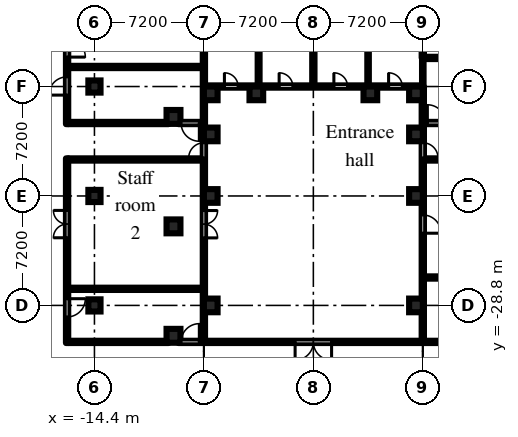
"""IFC4 building model, lengths in metres.
Left out: names, types, materials, properties, quantities, classifications, styles, units other than length and angle.
Written with IfcOpenShell. Run it as: python <this file> out.ifc"""

import sys

from ifc_helpers import new_model, si_unit, direction, frame, frame_2d, origin, origin_2d, place, context, subcontext, project, spatial, rectangle, hollow_circle, extrude, element, fill, save


model = new_model("IFC4")
c1 = context("Model", 3, precision=1e-05, world=origin(), true_north=direction((0.0, 1.0)))
c2 = subcontext(c1, "Body", "Model", "MODEL_VIEW")
j1 = project(units=[si_unit("LENGTHUNIT", "METRE"), si_unit("PLANEANGLEUNIT", "RADIAN")], contexts=[c1])
p1 = place(None, origin())
s1 = spatial("IfcSite", under=j1, at=p1, CompositionType="ELEMENT")
p2 = place(p1, origin())
s2 = spatial("IfcBuilding", under=s1, at=p2, CompositionType="ELEMENT")
p3 = place(p2, origin())
s3 = spatial("IfcBuildingStorey", under=s2, at=p3, CompositionType="ELEMENT", Elevation=0.0)
for number, where, z_axis, x_axis in (
    (1, (-6.75, -28.8, 0.0), (0.0, 0.0, 1.0), (1.0, 0.0, 0.0)),
    (2, (-6.75, -21.6, 0.0), (0.0, 0.0, 1.0), (1.0, 0.0, 0.0)),
    (3, (-6.75, -17.55, 0.0), (0.0, 0.0, 1.0), (1.0, 0.0, 0.0)),
    (4, (-6.75, -14.85, 0.0), (0.0, 0.0, 1.0), (1.0, 0.0, 0.0)),
    (5, (-3.75, -14.85, 0.0), (0.0, 0.0, 1.0), (1.0, 0.0, 0.0)),
    (6, (3.75, -14.85, 0.0), (0.0, 0.0, 1.0), (1.0, 0.0, 0.0)),
    (7, (6.75, -28.8, 0.0), (0.0, 0.0, 1.0), (1.0, 0.0, 0.0)),
    (8, (6.75, -21.6, 0.0), (0.0, 0.0, 1.0), (1.0, 0.0, 0.0)),
    (9, (6.75, -17.55, 0.0), (0.0, 0.0, 1.0), (1.0, 0.0, 0.0)),
    (10, (6.75, -14.85, 0.0), (0.0, 0.0, 1.0), (1.0, 0.0, 0.0)),
):
    element("IfcColumn", number, at=place(p3, frame(where, z_axis=z_axis, x_axis=x_axis)), inside=s3, PredefinedType="COLUMN", context=c2, shape_type="SweptSolid", body=[
        extrude(rectangle(XDim=0.9, YDim=0.9, at=origin_2d()), origin(), (0.0, 0.0, 1.0), 7.2),
    ])
for number, where, z_axis, x_axis in (
    (11, (-14.4, -28.8, 0.0), (0.0, 0.0, 1.0), (1.0, 0.0, 0.0)),
    (12, (-14.4, -21.6, 0.0), (0.0, 0.0, 1.0), (1.0, 0.0, 0.0)),
    (13, (-14.4, -14.4, 0.0), (0.0, 0.0, 1.0), (1.0, 0.0, 0.0)),
):
    element("IfcColumn", number, at=place(p3, frame(where, z_axis=z_axis, x_axis=x_axis)), inside=s3, PredefinedType="COLUMN", context=c2, shape_type="SweptSolid", body=[
        extrude(rectangle(XDim=0.8, YDim=0.8, at=origin_2d()), origin(), (0.0, 0.0, 1.0), 6.6),
    ])
for number, where, z_axis, x_axis in (
    (14, (-9.2, -16.4, 0.0), (0.0, 0.0, 1.0), (1.0, 0.0, 0.0)),
    (15, (-9.2, -23.6, 0.0), (0.0, 0.0, 1.0), (1.0, 0.0, 0.0)),
    (16, (-9.2, -30.8, 0.0), (0.0, 0.0, 1.0), (1.0, 0.0, 0.0)),
):
    element("IfcColumn", number, at=place(p3, frame(where, z_axis=z_axis, x_axis=x_axis)), inside=s3, PredefinedType="COLUMN", context=c2, shape_type="SweptSolid", body=[
        extrude(hollow_circle(Radius=0.457, WallThickness=0.05, at=origin_2d()), origin(), (0.0, 0.0, 1.0), 7.5),
    ])
p4 = place(p3, frame((-16.2, -31.275, 0.0), z_axis=(0.0, 0.0, 1.0), x_axis=(0.0, 1.0, 0.0)))
e17 = element("IfcWall", 17, at=p4, inside=s3, PredefinedType="PARTITIONING", context=c2, shape_type="SweptSolid", body=[
    extrude(rectangle(XDim=12.15, YDim=0.15, at=frame_2d((6.075, 0.0))), origin(), (0.0, 0.0, 1.0), 6.6),
])
p5 = place(p4, frame((1.717, 0.0, 0.0)))
e18 = element("IfcOpeningElement", 18, at=p5, cuts=e17, PredefinedType="OPENING", context=c2, shape_type="SweptSolid", body=[
    extrude(rectangle(XDim=1.2, YDim=2.1, at=frame_2d((0.6, 1.05))), frame((0.0, 0.085, 0.0), z_axis=(0.0, -1.0, 0.0), x_axis=(1.0, 0.0, 0.0)), (0.0, 0.0, 1.0), 0.17),
])
p6 = place(p4, frame((6.925, 0.0, 0.0)))
e19 = element("IfcOpeningElement", 19, at=p6, cuts=e17, PredefinedType="OPENING", context=c2, shape_type="SweptSolid", body=[
    extrude(rectangle(XDim=1.8, YDim=2.1, at=frame_2d((0.9, 1.05))), frame((0.0, 0.085, 0.0), z_axis=(0.0, -1.0, 0.0), x_axis=(1.0, 0.0, 0.0)), (0.0, 0.0, 1.0), 0.17),
])
p7 = place(p3, frame((-16.125, -31.2, 0.0), z_axis=(0.0, 0.0, 1.0), x_axis=(1.0, 0.0, 0.0)))
e20 = element("IfcWall", 20, at=p7, inside=s3, PredefinedType="PARTITIONING", context=c2, shape_type="SweptSolid", body=[
    extrude(rectangle(XDim=6.604, YDim=0.15, at=frame_2d((3.302, 0.0))), origin(), (0.0, 0.0, 1.0), 6.6),
])
p8 = place(p3, frame((-8.878, -31.2, 0.0), z_axis=(0.0, 0.0, 1.0), x_axis=(1.0, 0.0, 0.0)))
e21 = element("IfcWall", 21, at=p8, inside=s3, PredefinedType="PARTITIONING", context=c2, shape_type="SweptSolid", body=[
    extrude(rectangle(XDim=17.757, YDim=0.15, at=frame_2d((8.878, 0.0))), origin(), (0.0, 0.0, 1.0), 6.6),
])
p9 = place(p8, frame((7.678, 0.0, 0.0)))
e22 = element("IfcOpeningElement", 22, at=p9, cuts=e21, PredefinedType="OPENING", context=c2, shape_type="SweptSolid", body=[
    extrude(rectangle(XDim=2.4, YDim=2.1, at=frame_2d((1.2, 1.05))), frame((0.0, 0.085, 0.0), z_axis=(0.0, -1.0, 0.0), x_axis=(1.0, 0.0, 0.0)), (0.0, 0.0, 1.0), 0.17),
])
p10 = place(p8, frame((0.178, 0.0, 0.0)))
e23 = element("IfcOpeningElement", 23, at=p10, cuts=e21, PredefinedType="OPENING", context=c2, shape_type="SweptSolid", body=[
    extrude(rectangle(XDim=1.2, YDim=2.1, at=frame_2d((0.6, 1.05))), frame((0.0, 0.085, 0.0), z_axis=(0.0, -1.0, 0.0), x_axis=(1.0, 0.0, 0.0)), (0.0, 0.0, 1.0), 0.17),
])
for number, where, z_axis, x_axis in (
    (24, (-16.125, -27.708, 0.0), (0.0, 0.0, 1.0), (1.0, 0.0, 0.0)),
    (25, (-16.125, -19.2, 0.0), (0.0, 0.0, 1.0), (1.0, 0.0, 0.0)),
):
    element("IfcWall", number, at=place(p3, frame(where, z_axis=z_axis, x_axis=x_axis)), inside=s3, PredefinedType="PARTITIONING", context=c2, shape_type="SweptSolid", body=[
        extrude(rectangle(XDim=8.85, YDim=0.15, at=frame_2d((4.425, 0.0))), origin(), (0.0, 0.0, 1.0), 6.6),
    ])
p11 = place(p3, frame((-16.2, -16.875, 0.0), z_axis=(0.0, 0.0, 1.0), x_axis=(0.0, 1.0, 0.0)))
e26 = element("IfcWall", 26, at=p11, inside=s3, PredefinedType="PARTITIONING", context=c2, shape_type="SweptSolid", body=[
    extrude(rectangle(XDim=6.55, YDim=0.15, at=frame_2d((3.275, 0.0))), origin(), (0.0, 0.0, 1.0), 6.6),
])
p12 = place(p11, frame((1.911, 0.0, 0.0)))
e27 = element("IfcOpeningElement", 27, at=p12, cuts=e26, PredefinedType="OPENING", context=c2, shape_type="SweptSolid", body=[
    extrude(rectangle(XDim=1.2, YDim=2.1, at=frame_2d((0.6, 1.05))), frame((0.0, 0.085, 0.0), z_axis=(0.0, -1.0, 0.0), x_axis=(1.0, 0.0, 0.0)), (0.0, 0.0, 1.0), 0.17),
])
p13 = place(p11, frame((4.411, 0.0, 0.0)))
e28 = element("IfcOpeningElement", 28, at=p13, cuts=e26, PredefinedType="OPENING", context=c2, shape_type="SweptSolid", body=[
    extrude(rectangle(XDim=1.2, YDim=2.1, at=frame_2d((0.6, 1.05))), frame((0.0, 0.085, 0.0), z_axis=(0.0, -1.0, 0.0), x_axis=(1.0, 0.0, 0.0)), (0.0, 0.0, 1.0), 0.17),
])
p14 = place(p3, frame((-16.125, -16.8, 0.0), z_axis=(0.0, 0.0, 1.0), x_axis=(1.0, 0.0, 0.0)))
e29 = element("IfcWall", 29, at=p14, inside=s3, PredefinedType="PARTITIONING", context=c2, shape_type="SweptSolid", body=[
    extrude(rectangle(XDim=6.604, YDim=0.15, at=frame_2d((3.302, 0.0))), origin(), (0.0, 0.0, 1.0), 6.6),
])
p15 = place(p3, frame((-8.878, -16.8, 0.0), z_axis=(0.0, 0.0, 1.0), x_axis=(1.0, 0.0, 0.0)))
e30 = element("IfcWall", 30, at=p15, inside=s3, PredefinedType="PARTITIONING", context=c2, shape_type="SweptSolid", body=[
    extrude(rectangle(XDim=1.604, YDim=0.15, at=frame_2d((0.802, 0.0))), origin(), (0.0, 0.0, 1.0), 6.6),
])
p16 = place(p15, frame((0.178, 0.0, 0.0)))
e31 = element("IfcOpeningElement", 31, at=p16, cuts=e30, PredefinedType="OPENING", context=c2, shape_type="SweptSolid", body=[
    extrude(rectangle(XDim=1.2, YDim=2.1, at=frame_2d((0.6, 1.05))), frame((0.0, 0.085, 0.0), z_axis=(0.0, -1.0, 0.0), x_axis=(1.0, 0.0, 0.0)), (0.0, 0.0, 1.0), 0.17),
])
p17 = place(p3, frame((-16.125, -13.114, 0.0), z_axis=(0.0, 0.0, 1.0), x_axis=(1.0, 0.0, 0.0)))
e32 = element("IfcWall", 32, at=p17, inside=s3, PredefinedType="PARTITIONING", context=c2, shape_type="SweptSolid", body=[
    extrude(rectangle(XDim=8.85, YDim=0.15, at=frame_2d((4.425, 0.0))), origin(), (0.0, 0.0, 1.0), 6.6),
])
p18 = place(p3, frame((-7.2, -31.125, 0.0), z_axis=(0.0, 0.0, 1.0), x_axis=(0.0, 1.0, 0.0)))
e33 = element("IfcWall", 33, at=p18, inside=s3, PredefinedType="PARTITIONING", context=c2, shape_type="SweptSolid", body=[
    extrude(rectangle(XDim=23.988, YDim=0.15, at=frame_2d((11.994, 0.0))), origin(), (0.0, 0.0, 1.0), 6.3),
])
p19 = place(p18, frame((12.025, 0.0, 0.0)))
e34 = element("IfcOpeningElement", 34, at=p19, cuts=e33, PredefinedType="OPENING", context=c2, shape_type="SweptSolid", body=[
    extrude(rectangle(XDim=1.0, YDim=2.1, at=frame_2d((0.5, 1.05))), frame((0.0, 0.085, 0.0), z_axis=(0.0, -1.0, 0.0), x_axis=(1.0, 0.0, 0.0)), (0.0, 0.0, 1.0), 0.17),
])
p20 = place(p18, frame((6.767, 0.0, 0.0)))
e35 = element("IfcOpeningElement", 35, at=p20, cuts=e33, PredefinedType="OPENING", context=c2, shape_type="SweptSolid", body=[
    extrude(rectangle(XDim=1.8, YDim=2.1, at=frame_2d((0.9, 1.05))), frame((0.0, 0.085, 0.0), z_axis=(0.0, -1.0, 0.0), x_axis=(1.0, 0.0, 0.0)), (0.0, 0.0, 1.0), 0.17),
])
p21 = place(p3, frame((-7.125, -14.4, 0.0), z_axis=(0.0, 0.0, 1.0), x_axis=(1.0, 0.0, 0.0)))
e36 = element("IfcWall", 36, at=p21, inside=s3, PredefinedType="PARTITIONING", context=c2, shape_type="SweptSolid", body=[
    extrude(rectangle(XDim=14.25, YDim=0.15, at=frame_2d((7.125, 0.0))), origin(), (0.0, 0.0, 1.0), 6.6),
])
p22 = place(p21, frame((1.275, 0.0, 0.0)))
e37 = element("IfcOpeningElement", 37, at=p22, cuts=e36, PredefinedType="OPENING", context=c2, shape_type="SweptSolid", body=[
    extrude(rectangle(XDim=0.9, YDim=2.1, at=frame_2d((0.45, 1.05))), frame((0.0, 0.085, 0.0), z_axis=(0.0, -1.0, 0.0), x_axis=(1.0, 0.0, 0.0)), (0.0, 0.0, 1.0), 0.17),
])
p23 = place(p21, frame((4.875, 0.0, 0.0)))
e38 = element("IfcOpeningElement", 38, at=p23, cuts=e36, PredefinedType="OPENING", context=c2, shape_type="SweptSolid", body=[
    extrude(rectangle(XDim=0.9, YDim=2.1, at=frame_2d((0.45, 1.05))), frame((0.0, 0.085, 0.0), z_axis=(0.0, -1.0, 0.0), x_axis=(1.0, 0.0, 0.0)), (0.0, 0.0, 1.0), 0.17),
])
p24 = place(p21, frame((8.475, 0.0, 0.0)))
e39 = element("IfcOpeningElement", 39, at=p24, cuts=e36, PredefinedType="OPENING", context=c2, shape_type="SweptSolid", body=[
    extrude(rectangle(XDim=0.9, YDim=2.1, at=frame_2d((0.45, 1.05))), frame((0.0, 0.085, 0.0), z_axis=(0.0, -1.0, 0.0), x_axis=(1.0, 0.0, 0.0)), (0.0, 0.0, 1.0), 0.17),
])
p25 = place(p21, frame((12.075, 0.0, 0.0)))
e40 = element("IfcOpeningElement", 40, at=p25, cuts=e36, PredefinedType="OPENING", context=c2, shape_type="SweptSolid", body=[
    extrude(rectangle(XDim=0.9, YDim=2.1, at=frame_2d((0.45, 1.05))), frame((0.0, 0.085, 0.0), z_axis=(0.0, -1.0, 0.0), x_axis=(1.0, 0.0, 0.0)), (0.0, 0.0, 1.0), 0.17),
])
p26 = place(p3, frame((-3.6, -14.325, 0.0), z_axis=(0.0, 0.0, 1.0), x_axis=(0.0, 1.0, 0.0)))
e41 = element("IfcWall", 41, at=p26, inside=s3, PredefinedType="PARTITIONING", context=c2, shape_type="SweptSolid", body=[
    extrude(rectangle(XDim=7.062, YDim=0.125, at=frame_2d((3.531, 0.0))), origin(), (0.0, 0.0, 1.0), 6.6),
])
p27 = place(p3, frame((0.0, -14.325, 0.0), z_axis=(0.0, 0.0, 1.0), x_axis=(0.0, 1.0, 0.0)))
e42 = element("IfcWall", 42, at=p27, inside=s3, PredefinedType="PARTITIONING", context=c2, shape_type="SweptSolid", body=[
    extrude(rectangle(XDim=7.05, YDim=0.15, at=frame_2d((3.525, 0.0))), origin(), (0.0, 0.0, 1.0), 6.6),
])
p28 = place(p3, frame((3.6, -14.325, 0.0), z_axis=(0.0, 0.0, 1.0), x_axis=(0.0, 1.0, 0.0)))
e43 = element("IfcWall", 43, at=p28, inside=s3, PredefinedType="PARTITIONING", context=c2, shape_type="SweptSolid", body=[
    extrude(rectangle(XDim=7.05, YDim=0.1, at=frame_2d((3.525, 0.0))), origin(), (0.0, 0.0, 1.0), 6.6),
])
p29 = place(p3, frame((7.2, -31.125, 0.0), z_axis=(0.0, 0.0, 1.0), x_axis=(0.0, 1.0, 0.0)))
e44 = element("IfcWall", 44, at=p29, inside=s3, PredefinedType="PARTITIONING", context=c2, shape_type="SweptSolid", body=[
    extrude(rectangle(XDim=16.725, YDim=0.15, at=frame_2d((8.363, 0.0))), origin(), (0.0, 0.0, 1.0), 6.3),
])
p30 = place(p29, frame((12.025, 0.0, 0.0)))
e45 = element("IfcOpeningElement", 45, at=p30, cuts=e44, PredefinedType="OPENING", context=c2, shape_type="SweptSolid", body=[
    extrude(rectangle(XDim=1.0, YDim=2.1, at=frame_2d((0.5, 1.05))), frame((0.0, 0.085, 0.0), z_axis=(0.0, -1.0, 0.0), x_axis=(1.0, 0.0, 0.0)), (0.0, 0.0, 1.0), 0.17),
])
p31 = place(p29, frame((7.075, 0.0, 0.0)))
e46 = element("IfcOpeningElement", 46, at=p31, cuts=e44, PredefinedType="OPENING", context=c2, shape_type="SweptSolid", body=[
    extrude(rectangle(XDim=1.2, YDim=2.1, at=frame_2d((0.6, 1.05))), frame((0.0, 0.085, 0.0), z_axis=(0.0, -1.0, 0.0), x_axis=(1.0, 0.0, 0.0)), (0.0, 0.0, 1.0), 0.17),
])
for number, where, z_axis, x_axis in (
    (47, (7.275, -26.964, 0.0), (0.0, 0.0, 1.0), (1.0, 0.0, 0.0)),
    (48, (7.275, -19.2, 0.0), (0.0, 0.0, 1.0), (1.0, 0.0, 0.0)),
):
    element("IfcWall", number, at=place(p3, frame(where, z_axis=z_axis, x_axis=x_axis)), inside=s3, PredefinedType="PARTITIONING", context=c2, shape_type="SweptSolid", body=[
        extrude(rectangle(XDim=8.85, YDim=0.15, at=frame_2d((4.425, 0.0))), origin(), (0.0, 0.0, 1.0), 6.6),
    ])
p32 = place(p3, frame((7.275, -16.8, 0.0), z_axis=(0.0, 0.0, 1.0), x_axis=(1.0, 0.0, 0.0)))
e49 = element("IfcWall", 49, at=p32, inside=s3, PredefinedType="PARTITIONING", context=c2, shape_type="SweptSolid", body=[
    extrude(rectangle(XDim=1.604, YDim=0.15, at=frame_2d((0.802, 0.0))), origin(), (0.0, 0.0, 1.0), 6.6),
])
p33 = place(p32, frame((0.225, 0.0, 0.0)))
e50 = element("IfcOpeningElement", 50, at=p33, cuts=e49, PredefinedType="OPENING", context=c2, shape_type="SweptSolid", body=[
    extrude(rectangle(XDim=1.2, YDim=2.1, at=frame_2d((0.6, 1.05))), frame((0.0, 0.085, 0.0), z_axis=(0.0, -1.0, 0.0), x_axis=(1.0, 0.0, 0.0)), (0.0, 0.0, 1.0), 0.17),
])
p34 = place(p3, frame((7.2, -14.4, 0.0), z_axis=(0.0, 0.0, 1.0), x_axis=(0.0, 1.0, 0.0)))
e51 = element("IfcWall", 51, at=p34, inside=s3, PredefinedType="PARTITIONING", context=c2, shape_type="SweptSolid", body=[
    extrude(rectangle(XDim=1.882, YDim=0.1, at=frame_2d((0.941, 0.0))), origin(), (0.0, 0.0, 1.0), 6.3),
])
p35 = place(p3, frame((7.2, -12.518, 0.0), z_axis=(0.0, 0.0, 1.0), x_axis=(0.0, 1.0, 0.0)))
e52 = element("IfcWall", 52, at=p35, inside=s3, PredefinedType="PARTITIONING", context=c2, shape_type="SweptSolid", body=[
    extrude(rectangle(XDim=5.393, YDim=0.15, at=frame_2d((2.697, 0.0))), origin(), (0.0, 0.0, 1.0), 6.3),
])
p36 = place(p3, frame((7.275, -12.518, 0.0), z_axis=(0.0, 0.0, 1.0), x_axis=(1.0, 0.0, 0.0)))
e53 = element("IfcWall", 53, at=p36, inside=s3, PredefinedType="PARTITIONING", context=c2, shape_type="SweptSolid", body=[
    extrude(rectangle(XDim=8.85, YDim=0.15, at=frame_2d((4.425, 0.0))), origin(), (0.0, 0.0, 1.0), 6.6),
])
p37 = place(p19, origin())
e54 = element("IfcDoor", 54, at=p37, inside=s3, OperationType="SINGLE_SWING_LEFT", PredefinedType="DOOR", context=c2, shape_type="SweptSolid", body=[
    extrude(rectangle(XDim=1.0, YDim=2.1, at=frame_2d((0.5, 1.05))), frame((0.0, 0.025, 0.0), z_axis=(0.0, -1.0, 0.0), x_axis=(1.0, 0.0, 0.0)), (0.0, 0.0, 1.0), 0.05),
])
fill(e34, e54)
p38 = place(p9, frame((2.4, 0.0, 0.0), z_axis=(0.0, 0.0, 1.0), x_axis=(-1.0, 0.0, 0.0)))
e55 = element("IfcDoor", 55, at=p38, inside=s3, OperationType="DOUBLE_DOOR_DOUBLE_SWING", PredefinedType="DOOR", context=c2, shape_type="SweptSolid", body=[
    extrude(rectangle(XDim=2.4, YDim=2.1, at=frame_2d((1.2, 1.05))), frame((0.0, 0.025, 0.0), z_axis=(0.0, -1.0, 0.0), x_axis=(1.0, 0.0, 0.0)), (0.0, 0.0, 1.0), 0.05),
])
fill(e22, e55)
p39 = place(p30, frame((1.0, 0.0, 0.0), z_axis=(0.0, 0.0, 1.0), x_axis=(-1.0, 0.0, 0.0)))
e56 = element("IfcDoor", 56, at=p39, inside=s3, OperationType="SINGLE_SWING_RIGHT", PredefinedType="DOOR", context=c2, shape_type="SweptSolid", body=[
    extrude(rectangle(XDim=1.0, YDim=2.1, at=frame_2d((0.5, 1.05))), frame((0.0, 0.025, 0.0), z_axis=(0.0, -1.0, 0.0), x_axis=(1.0, 0.0, 0.0)), (0.0, 0.0, 1.0), 0.05),
])
fill(e45, e56)
p40 = place(p22, origin())
e57 = element("IfcDoor", 57, at=p40, inside=s3, OperationType="SINGLE_SWING_LEFT", PredefinedType="DOOR", context=c2, shape_type="SweptSolid", body=[
    extrude(rectangle(XDim=0.9, YDim=2.1, at=frame_2d((0.45, 1.05))), frame((0.0, 0.025, 0.0), z_axis=(0.0, -1.0, 0.0), x_axis=(1.0, 0.0, 0.0)), (0.0, 0.0, 1.0), 0.05),
])
fill(e37, e57)
p41 = place(p23, origin())
e58 = element("IfcDoor", 58, at=p41, inside=s3, OperationType="SINGLE_SWING_LEFT", PredefinedType="DOOR", context=c2, shape_type="SweptSolid", body=[
    extrude(rectangle(XDim=0.9, YDim=2.1, at=frame_2d((0.45, 1.05))), frame((0.0, 0.025, 0.0), z_axis=(0.0, -1.0, 0.0), x_axis=(1.0, 0.0, 0.0)), (0.0, 0.0, 1.0), 0.05),
])
fill(e38, e58)
p42 = place(p24, origin())
e59 = element("IfcDoor", 59, at=p42, inside=s3, OperationType="SINGLE_SWING_LEFT", PredefinedType="DOOR", context=c2, shape_type="SweptSolid", body=[
    extrude(rectangle(XDim=0.9, YDim=2.1, at=frame_2d((0.45, 1.05))), frame((0.0, 0.025, 0.0), z_axis=(0.0, -1.0, 0.0), x_axis=(1.0, 0.0, 0.0)), (0.0, 0.0, 1.0), 0.05),
])
fill(e39, e59)
p43 = place(p25, origin())
e60 = element("IfcDoor", 60, at=p43, inside=s3, OperationType="SINGLE_SWING_LEFT", PredefinedType="DOOR", context=c2, shape_type="SweptSolid", body=[
    extrude(rectangle(XDim=0.9, YDim=2.1, at=frame_2d((0.45, 1.05))), frame((0.0, 0.025, 0.0), z_axis=(0.0, -1.0, 0.0), x_axis=(1.0, 0.0, 0.0)), (0.0, 0.0, 1.0), 0.05),
])
fill(e40, e60)
p44 = place(p12, origin())
e61 = element("IfcDoor", 61, at=p44, inside=s3, OperationType="SINGLE_SWING_LEFT", PredefinedType="DOOR", context=c2, shape_type="SweptSolid", body=[
    extrude(rectangle(XDim=1.2, YDim=2.1, at=frame_2d((0.6, 1.05))), frame((0.0, 0.025, 0.0), z_axis=(0.0, -1.0, 0.0), x_axis=(1.0, 0.0, 0.0)), (0.0, 0.0, 1.0), 0.05),
])
fill(e27, e61)
p45 = place(p16, frame((1.2, 0.0, 0.0), z_axis=(0.0, 0.0, 1.0), x_axis=(-1.0, 0.0, 0.0)))
e62 = element("IfcDoor", 62, at=p45, inside=s3, OperationType="SINGLE_SWING_LEFT", PredefinedType="DOOR", context=c2, shape_type="SweptSolid", body=[
    extrude(rectangle(XDim=1.2, YDim=2.1, at=frame_2d((0.6, 1.05))), frame((0.0, 0.025, 0.0), z_axis=(0.0, -1.0, 0.0), x_axis=(1.0, 0.0, 0.0)), (0.0, 0.0, 1.0), 0.05),
])
fill(e31, e62)
p46 = place(p13, frame((1.2, 0.0, 0.0), z_axis=(0.0, 0.0, 1.0), x_axis=(-1.0, 0.0, 0.0)))
e63 = element("IfcDoor", 63, at=p46, inside=s3, OperationType="SINGLE_SWING_RIGHT", PredefinedType="DOOR", context=c2, shape_type="SweptSolid", body=[
    extrude(rectangle(XDim=1.2, YDim=2.1, at=frame_2d((0.6, 1.05))), frame((0.0, 0.025, 0.0), z_axis=(0.0, -1.0, 0.0), x_axis=(1.0, 0.0, 0.0)), (0.0, 0.0, 1.0), 0.05),
])
fill(e28, e63)
p47 = place(p5, frame((1.2, 0.0, 0.0), z_axis=(0.0, 0.0, 1.0), x_axis=(-1.0, 0.0, 0.0)))
e64 = element("IfcDoor", 64, at=p47, inside=s3, OperationType="SINGLE_SWING_LEFT", PredefinedType="DOOR", context=c2, shape_type="SweptSolid", body=[
    extrude(rectangle(XDim=1.2, YDim=2.1, at=frame_2d((0.6, 1.05))), frame((0.0, 0.025, 0.0), z_axis=(0.0, -1.0, 0.0), x_axis=(1.0, 0.0, 0.0)), (0.0, 0.0, 1.0), 0.05),
])
fill(e18, e64)
p48 = place(p10, origin())
e65 = element("IfcDoor", 65, at=p48, inside=s3, OperationType="SINGLE_SWING_RIGHT", PredefinedType="DOOR", context=c2, shape_type="SweptSolid", body=[
    extrude(rectangle(XDim=1.2, YDim=2.1, at=frame_2d((0.6, 1.05))), frame((0.0, 0.025, 0.0), z_axis=(0.0, -1.0, 0.0), x_axis=(1.0, 0.0, 0.0)), (0.0, 0.0, 1.0), 0.05),
])
fill(e23, e65)
p49 = place(p6, origin())
e66 = element("IfcDoor", 66, at=p49, inside=s3, OperationType="DOUBLE_DOOR_DOUBLE_SWING", PredefinedType="DOOR", context=c2, shape_type="SweptSolid", body=[
    extrude(rectangle(XDim=1.8, YDim=2.1, at=frame_2d((0.9, 1.05))), frame((0.0, 0.025, 0.0), z_axis=(0.0, -1.0, 0.0), x_axis=(1.0, 0.0, 0.0)), (0.0, 0.0, 1.0), 0.05),
])
fill(e19, e66)
p50 = place(p20, frame((1.8, 0.0, 0.0), z_axis=(0.0, 0.0, 1.0), x_axis=(-1.0, 0.0, 0.0)))
e67 = element("IfcDoor", 67, at=p50, inside=s3, OperationType="DOUBLE_DOOR_DOUBLE_SWING", PredefinedType="DOOR", context=c2, shape_type="SweptSolid", body=[
    extrude(rectangle(XDim=1.8, YDim=2.1, at=frame_2d((0.9, 1.05))), frame((0.0, 0.025, 0.0), z_axis=(0.0, -1.0, 0.0), x_axis=(1.0, 0.0, 0.0)), (0.0, 0.0, 1.0), 0.05),
])
fill(e35, e67)
p51 = place(p33, origin())
e68 = element("IfcDoor", 68, at=p51, inside=s3, OperationType="SINGLE_SWING_LEFT", PredefinedType="DOOR", context=c2, shape_type="SweptSolid", body=[
    extrude(rectangle(XDim=1.2, YDim=2.1, at=frame_2d((0.6, 1.05))), frame((0.0, 0.025, 0.0), z_axis=(0.0, -1.0, 0.0), x_axis=(1.0, 0.0, 0.0)), (0.0, 0.0, 1.0), 0.05),
])
fill(e50, e68)
p52 = place(p31, frame((1.2, 0.0, 0.0), z_axis=(0.0, 0.0, 1.0), x_axis=(-1.0, 0.0, 0.0)))
e69 = element("IfcDoor", 69, at=p52, inside=s3, OperationType="SINGLE_SWING_RIGHT", PredefinedType="DOOR", context=c2, shape_type="SweptSolid", body=[
    extrude(rectangle(XDim=1.2, YDim=2.1, at=frame_2d((0.6, 1.05))), frame((0.0, 0.025, 0.0), z_axis=(0.0, -1.0, 0.0), x_axis=(1.0, 0.0, 0.0)), (0.0, 0.0, 1.0), 0.05),
])
fill(e46, e69)
save(model, sys.argv[1])
